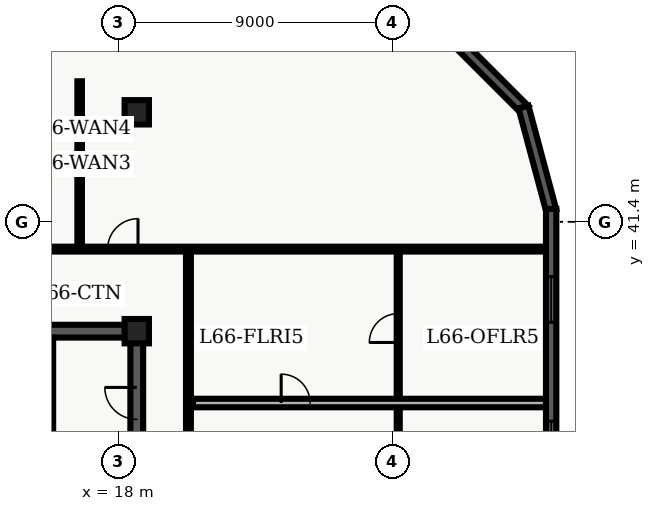
"""IFC4 building model, lengths in metres.
Left out: names, types, materials, properties, quantities, classifications, styles, units other than length and angle.
Written with IfcOpenShell. Run it as: python <this file> out.ifc"""

import sys

from ifc_helpers import new_model, entity, si_unit, converted_unit, direction, frame, origin_with_axes, origin_2d_with_axis, place, context, subcontext, project, spatial, polyline, rectangle, outline, extrude, element, fill, save


model = new_model("IFC4")
c1 = context("Model", 3, precision=1e-05, world=origin_with_axes(), true_north=direction((0.0, 1.0)))
c2 = subcontext(c1, "Body", "Model", "MODEL_VIEW")
j1 = project(units=[si_unit("LENGTHUNIT", "METRE"), converted_unit("PLANEANGLEUNIT", "DEGREE", entity("IfcPlaneAngleMeasure", 0.017), si_unit("PLANEANGLEUNIT", "RADIAN"), dimensions=[0, 0, 0, 0, 0, 0, 0])], contexts=[c1])
p1 = place(None, origin_with_axes())
s1 = spatial("IfcSite", under=j1, at=p1, CompositionType="ELEMENT")
p2 = place(p1, origin_with_axes())
s2 = spatial("IfcBuilding", under=s1, at=p2, CompositionType="ELEMENT")
p3 = place(p2, frame((0.0, 0.0, 268.5), z_axis=(0.0, 0.0, 1.0), x_axis=(1.0, 0.0, 0.0)))
s3 = spatial("IfcBuildingStorey", under=s2, at=p3, CompositionType="ELEMENT", Elevation=268.5)
p4 = place(p3, frame((11.4, 37.8, 0.0), z_axis=(0.0, 0.0, 1.0), x_axis=(1.0, 0.0, 0.0)))
e1 = element("IfcWall", 1, at=p4, inside=s3, PredefinedType="SHEAR", context=c2, shape_type="SweptSolid", body=[
    extrude(outline(polyline([(0.0, -0.21), (7.2, -0.21), (7.2, 0.21), (0.0, 0.21), (0.0, -0.21)])), origin_with_axes(), (0.0, 0.0, 1.0), 3.66),
])
p5 = place(p4, frame((2.625, 0.0, 0.0), z_axis=(0.0, 0.0, 1.0), x_axis=(1.0, 0.0, 0.0)))
e2 = element("IfcOpeningElement", 2, at=p5, cuts=e1, PredefinedType="OPENING", context=c2, shape_type="SweptSolid", body=[
    extrude(rectangle(XDim=1.05, YDim=0.44, at=origin_2d_with_axis()), origin_with_axes(), (0.0, 0.0, 1.0), 2.15),
])
p6 = place(p3, frame((18.6, 24.3, 0.0), z_axis=(0.0, 0.0, 1.0), x_axis=(0.0, 1.0, 0.0)))
e3 = element("IfcWall", 3, at=p6, inside=s3, PredefinedType="SHEAR", context=c2, shape_type="SweptSolid", body=[
    extrude(outline(polyline([(0.0, -0.21), (13.5, -0.21), (13.5, 0.21), (0.0, 0.21), (0.0, -0.21)])), origin_with_axes(), (0.0, 0.0, 1.0), 3.66),
])
p7 = place(p6, frame((6.725, 0.0, 0.0), z_axis=(0.0, 0.0, 1.0), x_axis=(1.0, 0.0, 0.0)))
e4 = element("IfcOpeningElement", 4, at=p7, cuts=e3, PredefinedType="OPENING", context=c2, shape_type="SweptSolid", body=[
    extrude(rectangle(XDim=1.05, YDim=0.44, at=origin_2d_with_axis()), origin_with_axes(), (0.0, 0.0, 1.0), 2.15),
])
p8 = place(p6, frame((11.125, 0.0, 0.0), z_axis=(0.0, 0.0, 1.0), x_axis=(1.0, 0.0, 0.0)))
e5 = element("IfcOpeningElement", 5, at=p8, cuts=e3, PredefinedType="OPENING", context=c2, shape_type="SweptSolid", body=[
    extrude(rectangle(XDim=1.05, YDim=0.44, at=origin_2d_with_axis()), origin_with_axes(), (0.0, 0.0, 1.0), 2.15),
])
p9 = place(p3, frame((15.725, 28.9, 0.0), z_axis=(0.0, 0.0, 1.0), x_axis=(0.0, 1.0, 0.0)))
e6 = element("IfcWall", 6, at=p9, inside=s3, PredefinedType="SHEAR", context=c2, shape_type="SweptSolid", body=[
    extrude(outline(polyline([(0.0, -0.125), (8.69, -0.125), (8.69, 0.125), (0.0, 0.125), (0.0, -0.125)])), origin_with_axes(), (0.0, 0.0, 1.0), 3.66),
])
for number, where, z_axis, x_axis in (
    (7, (18.6, 37.8, 0.0), (0.0, 0.0, 1.0), (1.0, 0.0, 0.0)),
    (8, (18.6, 45.0, 0.0), (0.0, 0.0, 1.0), (1.0, 0.0, 0.0)),
):
    element("IfcColumn", number, at=place(p3, frame(where, z_axis=z_axis, x_axis=x_axis)), inside=s3, PredefinedType="COLUMN", context=c2, shape_type="SweptSolid", body=[
        extrude(rectangle(XDim=0.8, YDim=0.8, at=origin_2d_with_axis()), origin_with_axes(), (0.0, 0.0, 1.0), 3.9),
    ])
p10 = place(p3, frame((8.135, 40.5, 0.0), z_axis=(0.0, 0.0, 1.0), x_axis=(1.0, 0.0, 0.0)))
e9 = element("IfcWall", 9, at=p10, inside=s3, PredefinedType="PARTITIONING", context=c2, shape_type="SweptSolid", body=[
    extrude(outline(polyline([(0.0, -0.08), (23.93, -0.08), (23.93, 0.08), (0.0, 0.08), (0.0, -0.08)])), origin_with_axes(), (0.0, 0.0, 1.0), 2.7),
])
p11 = place(p10, frame((0.76, 0.0, 0.0), z_axis=(0.0, 0.0, 1.0), x_axis=(1.0, 0.0, 0.0)))
e10 = element("IfcOpeningElement", 10, at=p11, cuts=e9, PredefinedType="OPENING", context=c2, shape_type="SweptSolid", body=[
    extrude(rectangle(XDim=1.0, YDim=0.18, at=origin_2d_with_axis()), origin_with_axes(), (0.0, 0.0, 1.0), 2.15),
])
p12 = place(p10, frame((4.39, 0.0, 0.0), z_axis=(0.0, 0.0, 1.0), x_axis=(1.0, 0.0, 0.0)))
e11 = element("IfcOpeningElement", 11, at=p12, cuts=e9, PredefinedType="OPENING", context=c2, shape_type="SweptSolid", body=[
    extrude(rectangle(XDim=1.0, YDim=0.18, at=origin_2d_with_axis()), origin_with_axes(), (0.0, 0.0, 1.0), 2.15),
])
p13 = place(p10, frame((7.051, 0.0, 0.0), z_axis=(0.0, 0.0, 1.0), x_axis=(1.0, 0.0, 0.0)))
e12 = element("IfcOpeningElement", 12, at=p13, cuts=e9, PredefinedType="OPENING", context=c2, shape_type="SweptSolid", body=[
    extrude(rectangle(XDim=1.0, YDim=0.18, at=origin_2d_with_axis()), origin_with_axes(), (0.0, 0.0, 1.0), 2.15),
])
p14 = place(p10, frame((10.006, 0.0, 0.0), z_axis=(0.0, 0.0, 1.0), x_axis=(1.0, 0.0, 0.0)))
e13 = element("IfcOpeningElement", 13, at=p14, cuts=e9, PredefinedType="OPENING", context=c2, shape_type="SweptSolid", body=[
    extrude(rectangle(XDim=1.0, YDim=0.18, at=origin_2d_with_axis()), origin_with_axes(), (0.0, 0.0, 1.0), 2.15),
])
p15 = place(p3, frame((20.3, 7.8, 0.0), z_axis=(0.0, 0.0, 1.0), x_axis=(0.0, 1.0, 0.0)))
e14 = element("IfcWall", 14, at=p15, inside=s3, PredefinedType="PARTITIONING", context=c2, shape_type="SweptSolid", body=[
    extrude(outline(polyline([(0.0, -0.08), (32.7, -0.08), (32.7, 0.08), (0.0, 0.08), (0.0, -0.08)])), origin_with_axes(), (0.0, 0.0, 1.0), 2.7),
])
p16 = place(p15, frame((14.2, 0.0, 0.0), z_axis=(0.0, 0.0, 1.0), x_axis=(1.0, 0.0, 0.0)))
e15 = element("IfcOpeningElement", 15, at=p16, cuts=e14, PredefinedType="OPENING", context=c2, shape_type="SweptSolid", body=[
    extrude(rectangle(XDim=1.0, YDim=0.18, at=origin_2d_with_axis()), origin_with_axes(), (0.0, 0.0, 1.0), 2.15),
])
p17 = place(p15, frame((18.215, 0.0, 0.0), z_axis=(0.0, 0.0, 1.0), x_axis=(1.0, 0.0, 0.0)))
e16 = element("IfcOpeningElement", 16, at=p17, cuts=e14, PredefinedType="OPENING", context=c2, shape_type="SweptSolid", body=[
    extrude(rectangle(XDim=1.0, YDim=0.18, at=origin_2d_with_axis()), origin_with_axes(), (0.0, 0.0, 1.0), 2.15),
])
p18 = place(p15, frame((22.221, 0.0, 0.0), z_axis=(0.0, 0.0, 1.0), x_axis=(1.0, 0.0, 0.0)))
e17 = element("IfcOpeningElement", 17, at=p18, cuts=e14, PredefinedType="OPENING", context=c2, shape_type="SweptSolid", body=[
    extrude(rectangle(XDim=1.0, YDim=0.18, at=origin_2d_with_axis()), origin_with_axes(), (0.0, 0.0, 1.0), 2.15),
])
p19 = place(p15, frame((25.553, 0.0, 0.0), z_axis=(0.0, 0.0, 1.0), x_axis=(1.0, 0.0, 0.0)))
e18 = element("IfcOpeningElement", 18, at=p19, cuts=e14, PredefinedType="OPENING", context=c2, shape_type="SweptSolid", body=[
    extrude(rectangle(XDim=1.0, YDim=0.18, at=origin_2d_with_axis()), origin_with_axes(), (0.0, 0.0, 1.0), 2.15),
])
p20 = place(p15, frame((5.475, 0.0, 0.0), z_axis=(0.0, 0.0, 1.0), x_axis=(1.0, 0.0, 0.0)))
e19 = element("IfcOpeningElement", 19, at=p20, cuts=e14, PredefinedType="OPENING", context=c2, shape_type="SweptSolid", body=[
    extrude(rectangle(XDim=1.05, YDim=0.18, at=origin_2d_with_axis()), origin_with_axes(), (0.0, 0.0, 1.0), 2.15),
])
p21 = place(p3, frame((16.722, 40.6, 0.0), z_axis=(0.0, 0.0, 1.0), x_axis=(0.0, 1.0, 0.0)))
e20 = element("IfcWall", 20, at=p21, inside=s3, PredefinedType="PARTITIONING", context=c2, shape_type="SweptSolid", body=[
    extrude(outline(polyline([(0.0, -0.075), (5.42, -0.075), (5.42, 0.075), (0.0, 0.075), (0.0, -0.075)])), origin_with_axes(), (0.0, 0.0, 1.0), 2.7),
])
p22 = place(p3, frame((27.2, 21.4, 0.0), z_axis=(0.0, 0.0, 1.0), x_axis=(0.0, 1.0, 0.0)))
e21 = element("IfcWall", 21, at=p22, inside=s3, PredefinedType="PARTITIONING", context=c2, shape_type="SweptSolid", body=[
    extrude(outline(polyline([(0.0, -0.05), (18.9, -0.05), (18.9, 0.05), (0.0, 0.05), (0.0, -0.05)])), origin_with_axes(), (0.0, 0.0, 1.0), 2.7),
])
p23 = place(p22, frame((1.452, 0.0, 0.0), z_axis=(0.0, 0.0, 1.0), x_axis=(1.0, 0.0, 0.0)))
e22 = element("IfcOpeningElement", 22, at=p23, cuts=e21, PredefinedType="OPENING", context=c2, shape_type="SweptSolid", body=[
    extrude(rectangle(XDim=0.95, YDim=0.12, at=origin_2d_with_axis()), origin_with_axes(), (0.0, 0.0, 1.0), 2.15),
])
p24 = place(p22, frame((4.614, 0.0, 0.0), z_axis=(0.0, 0.0, 1.0), x_axis=(1.0, 0.0, 0.0)))
e23 = element("IfcOpeningElement", 23, at=p24, cuts=e21, PredefinedType="OPENING", context=c2, shape_type="SweptSolid", body=[
    extrude(rectangle(XDim=0.95, YDim=0.12, at=origin_2d_with_axis()), origin_with_axes(), (0.0, 0.0, 1.0), 2.15),
])
p25 = place(p22, frame((8.062, 0.0, 0.0), z_axis=(0.0, 0.0, 1.0), x_axis=(1.0, 0.0, 0.0)))
e24 = element("IfcOpeningElement", 24, at=p25, cuts=e21, PredefinedType="OPENING", context=c2, shape_type="SweptSolid", body=[
    extrude(rectangle(XDim=0.95, YDim=0.12, at=origin_2d_with_axis()), origin_with_axes(), (0.0, 0.0, 1.0), 2.15),
])
p26 = place(p22, frame((11.953, 0.0, 0.0), z_axis=(0.0, 0.0, 1.0), x_axis=(1.0, 0.0, 0.0)))
e25 = element("IfcOpeningElement", 25, at=p26, cuts=e21, PredefinedType="OPENING", context=c2, shape_type="SweptSolid", body=[
    extrude(rectangle(XDim=0.95, YDim=0.12, at=origin_2d_with_axis()), origin_with_axes(), (0.0, 0.0, 1.0), 2.15),
])
p27 = place(p22, frame((16.503, 0.0, 0.0), z_axis=(0.0, 0.0, 1.0), x_axis=(1.0, 0.0, 0.0)))
e26 = element("IfcOpeningElement", 26, at=p27, cuts=e21, PredefinedType="OPENING", context=c2, shape_type="SweptSolid", body=[
    extrude(rectangle(XDim=0.95, YDim=0.12, at=origin_2d_with_axis()), origin_with_axes(), (0.0, 0.0, 1.0), 2.15),
])
p28 = place(p3, frame((20.45, 35.437, 0.0), z_axis=(0.0, 0.0, 1.0), x_axis=(1.0, 0.0, 0.0)))
e27 = element("IfcWall", 27, at=p28, inside=s3, PredefinedType="PARTITIONING", context=c2, shape_type="SweptSolid", body=[
    extrude(outline(polyline([(0.0, -0.14), (11.615, -0.14), (11.615, 0.14), (0.0, 0.14), (0.0, -0.14)])), origin_with_axes(), (0.0, 0.0, 1.0), 2.7),
])
p29 = place(p28, frame((3.375, 0.0, 0.0), z_axis=(0.0, 0.0, 1.0), x_axis=(1.0, 0.0, 0.0)))
e28 = element("IfcOpeningElement", 28, at=p29, cuts=e27, PredefinedType="OPENING", context=c2, shape_type="SweptSolid", body=[
    extrude(rectangle(XDim=0.95, YDim=0.3, at=origin_2d_with_axis()), origin_with_axes(), (0.0, 0.0, 1.0), 2.15),
])
p30 = place(p3, frame((28.866, 47.583, 0.0), z_axis=(0.0, 0.0, 1.0), x_axis=(0.707107, -0.707107, 0.0)))
e29 = element("IfcWall", 29, at=p30, inside=s3, PredefinedType="SOLIDWALL", context=c2, shape_type="SweptSolid", body=[
    extrude(outline(polyline([(0.0, -0.17), (3.54, -0.17), (3.54, 0.17), (0.0, 0.17), (0.0, -0.17)])), origin_with_axes(), (0.0, 0.0, 1.0), 3.66),
])
p31 = place(p3, frame((31.32, 45.175, 0.0), z_axis=(0.0, 0.0, 1.0), x_axis=(0.258788, -0.965934, 0.0)))
e30 = element("IfcWall", 30, at=p31, inside=s3, PredefinedType="SOLIDWALL", context=c2, shape_type="SweptSolid", body=[
    extrude(outline(polyline([(0.0, -0.17), (3.54, -0.17), (3.54, 0.17), (0.0, 0.17), (0.0, -0.17)])), origin_with_axes(), (0.0, 0.0, 1.0), 3.66),
])
p32 = place(p3, frame((32.23, 41.82, 0.0), z_axis=(0.0, 0.0, 1.0), x_axis=(0.0, -1.0, 0.0)))
e31 = element("IfcWall", 31, at=p32, inside=s3, PredefinedType="SOLIDWALL", context=c2, shape_type="SweptSolid", body=[
    extrude(outline(polyline([(0.0, -0.17), (20.22, -0.17), (20.22, 0.17), (0.0, 0.17), (0.0, -0.17)])), origin_with_axes(), (0.0, 0.0, 1.0), 3.66),
])
p33 = place(p32, frame((2.978, 0.0, 0.45), z_axis=(0.0, 0.0, 1.0), x_axis=(1.0, 0.0, 0.0)))
e32 = element("IfcOpeningElement", 32, at=p33, cuts=e31, PredefinedType="OPENING", context=c2, shape_type="SweptSolid", body=[
    extrude(rectangle(XDim=1.5, YDim=0.36, at=origin_2d_with_axis()), origin_with_axes(), (0.0, 0.0, 1.0), 2.1),
])
p34 = place(p32, frame((7.732, 0.0, 0.45), z_axis=(0.0, 0.0, 1.0), x_axis=(1.0, 0.0, 0.0)))
e33 = element("IfcOpeningElement", 33, at=p34, cuts=e31, PredefinedType="OPENING", context=c2, shape_type="SweptSolid", body=[
    extrude(rectangle(XDim=1.5, YDim=0.36, at=origin_2d_with_axis()), origin_with_axes(), (0.0, 0.0, 1.0), 2.1),
])
p35 = place(p32, frame((12.487, 0.0, 0.45), z_axis=(0.0, 0.0, 1.0), x_axis=(1.0, 0.0, 0.0)))
e34 = element("IfcOpeningElement", 34, at=p35, cuts=e31, PredefinedType="OPENING", context=c2, shape_type="SweptSolid", body=[
    extrude(rectangle(XDim=1.5, YDim=0.36, at=origin_2d_with_axis()), origin_with_axes(), (0.0, 0.0, 1.0), 2.1),
])
p36 = place(p6, frame((11.125, 0.0, 0.0), z_axis=(0.0, 0.0, 1.0), x_axis=(1.0, 0.0, 0.0)))
e35 = element("IfcDoor", 35, at=p36, inside=s3, OperationType="SINGLE_SWING_RIGHT", PredefinedType="DOOR", context=c2, shape_type="SweptSolid", body=[
    extrude(rectangle(XDim=1.05, YDim=0.09, at=origin_2d_with_axis()), origin_with_axes(), (0.0, 0.0, 1.0), 2.15),
])
fill(e5, e35)
p37 = place(p10, frame((10.006, 0.0, 0.0), z_axis=(0.0, 0.0, 1.0), x_axis=(1.0, 0.0, 0.0)))
e36 = element("IfcDoor", 36, at=p37, inside=s3, OperationType="SINGLE_SWING_RIGHT", PredefinedType="DOOR", context=c2, shape_type="SweptSolid", body=[
    extrude(rectangle(XDim=1.0, YDim=0.09, at=origin_2d_with_axis()), origin_with_axes(), (0.0, 0.0, 1.0), 2.15),
])
fill(e13, e36)
p38 = place(p22, frame((16.503, 0.0, 0.0), z_axis=(0.0, 0.0, 1.0), x_axis=(1.0, 0.0, 0.0)))
e37 = element("IfcDoor", 37, at=p38, inside=s3, OperationType="SINGLE_SWING_LEFT", PredefinedType="DOOR", context=c2, shape_type="SweptSolid", body=[
    extrude(rectangle(XDim=0.95, YDim=0.06, at=origin_2d_with_axis()), origin_with_axes(), (0.0, 0.0, 1.0), 2.15),
])
fill(e26, e37)
p39 = place(p28, frame((3.375, 0.0, 0.0), z_axis=(0.0, 0.0, 1.0), x_axis=(1.0, 0.0, 0.0)))
e38 = element("IfcDoor", 38, at=p39, inside=s3, OperationType="SINGLE_SWING_LEFT", PredefinedType="DOOR", context=c2, shape_type="SweptSolid", body=[
    extrude(rectangle(XDim=0.95, YDim=0.09, at=origin_2d_with_axis()), origin_with_axes(), (0.0, 0.0, 1.0), 2.15),
])
fill(e28, e38)
p40 = place(p32, frame((2.978, 0.0, 0.45), z_axis=(0.0, 0.0, 1.0), x_axis=(1.0, 0.0, 0.0)))
e39 = element("IfcWindow", 39, at=p40, inside=s3, PredefinedType="WINDOW", context=c2, shape_type="SweptSolid", body=[
    extrude(rectangle(XDim=1.5, YDim=0.09, at=origin_2d_with_axis()), origin_with_axes(), (0.0, 0.0, 1.0), 2.1),
])
fill(e32, e39)
p41 = place(p32, frame((7.732, 0.0, 0.45), z_axis=(0.0, 0.0, 1.0), x_axis=(1.0, 0.0, 0.0)))
e40 = element("IfcWindow", 40, at=p41, inside=s3, PredefinedType="WINDOW", context=c2, shape_type="SweptSolid", body=[
    extrude(rectangle(XDim=1.5, YDim=0.09, at=origin_2d_with_axis()), origin_with_axes(), (0.0, 0.0, 1.0), 2.1),
])
fill(e33, e40)
save(model, sys.argv[1])
